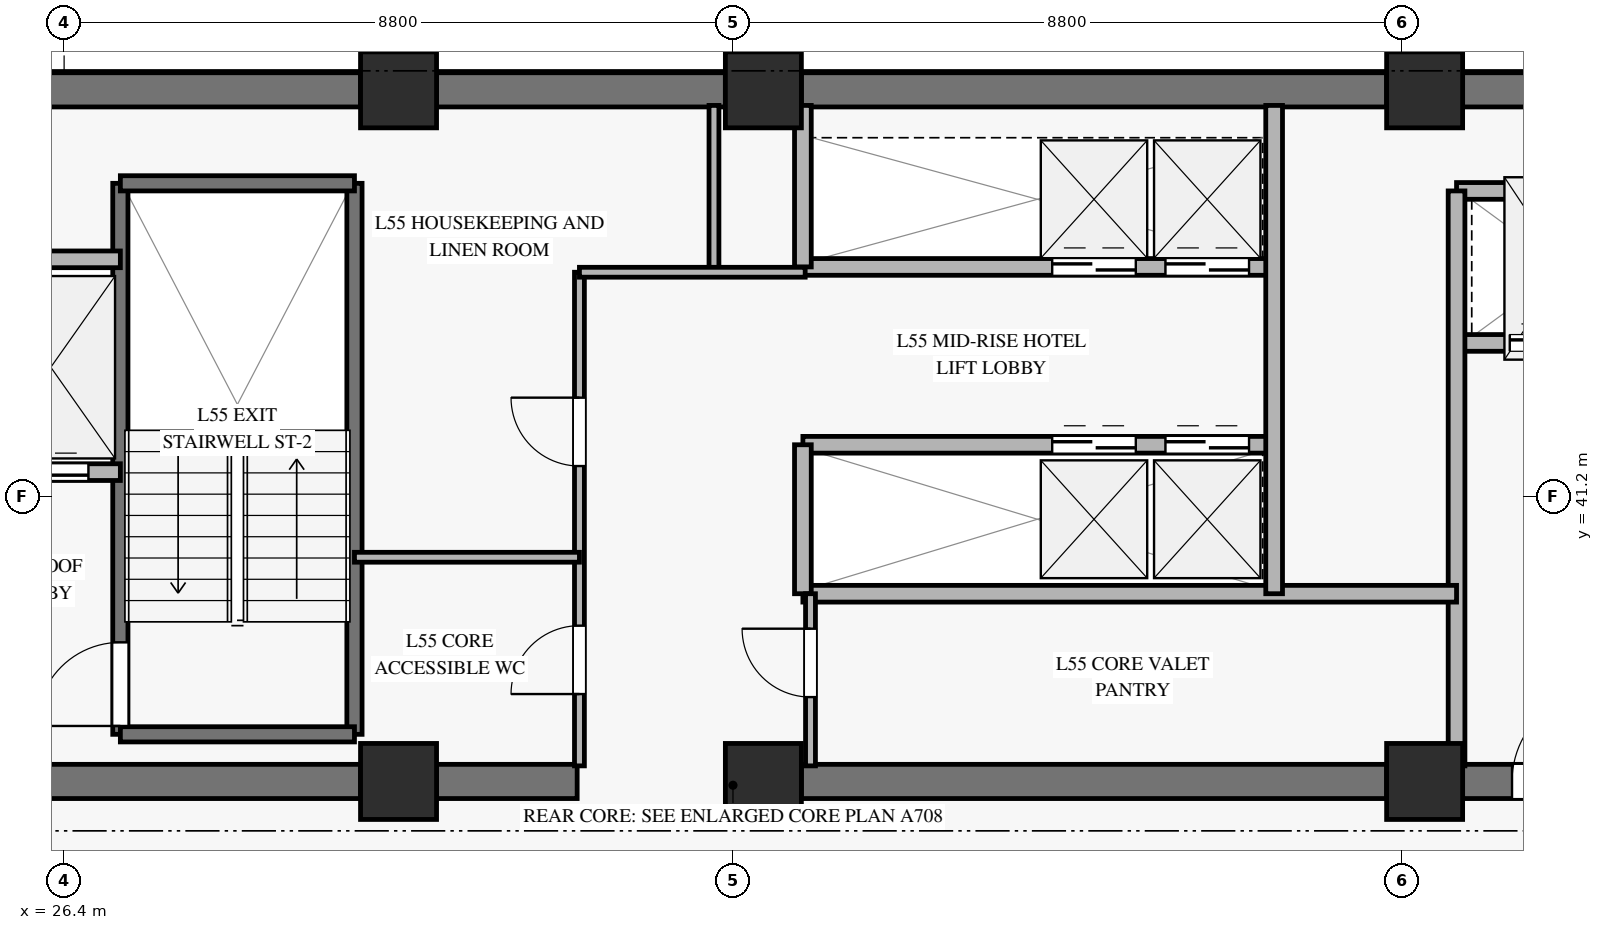
"""IFC4 building model, lengths in metres.
Left out: names, types, materials, properties, quantities, classifications, styles, units other than length and angle.
Written with IfcOpenShell. Run it as: python <this file> out.ifc"""

import sys

from ifc_helpers import new_model, si_unit, direction, frame, frame_2d, origin, origin_2d, place, context, subcontext, project, spatial, rectangle, extrude, source, transform, mapped, element, fill, save


model = new_model("IFC4")
c1 = context("Model", 3, precision=1e-05, world=origin(), true_north=direction((0.0, 1.0)))
c2 = subcontext(c1, "Body", "Model", "MODEL_VIEW")
j1 = project(units=[si_unit("LENGTHUNIT", "METRE"), si_unit("PLANEANGLEUNIT", "RADIAN")], contexts=[c1])
p1 = place(None, origin())
s1 = spatial("IfcSite", under=j1, at=p1, CompositionType="ELEMENT")
p2 = place(p1, origin())
s2 = spatial("IfcBuilding", under=s1, at=p2, CompositionType="ELEMENT")
p3 = place(p2, frame((0.0, 0.0, 216.7)))
s3 = spatial("IfcBuildingStorey", under=s2, at=p3, CompositionType="ELEMENT", Elevation=216.7)
m1 = source(origin(), c2, "Body", "SweptSolid", [
    extrude(rectangle(XDim=1.0, YDim=1.0, at=origin_2d()), origin(), (0.0, 0.0, 1.0), 3.24),
])
for number, where, z_axis, x_axis in (
    (1, (30.8, 37.45, 0.0), (0.0, 0.0, 1.0), (1.0, 0.0, 0.0)),
    (2, (30.8, 46.55, 0.0), (0.0, 0.0, 1.0), (1.0, 0.0, 0.0)),
    (3, (35.6, 37.45, 0.0), (0.0, 0.0, 1.0), (1.0, 0.0, 0.0)),
    (4, (35.6, 46.55, 0.0), (0.0, 0.0, 1.0), (1.0, 0.0, 0.0)),
    (5, (44.3, 37.45, 0.0), (0.0, 0.0, 1.0), (1.0, 0.0, 0.0)),
    (6, (44.3, 46.55, 0.0), (0.0, 0.0, 1.0), (1.0, 0.0, 0.0)),
):
    element("IfcColumn", number, at=place(p3, frame(where, z_axis=z_axis, x_axis=x_axis)), inside=s3, PredefinedType="PILASTER", context=c2, shape_type="MappedRepresentation", body=[
        mapped(m1, transform((0.0, 0.0, 0.0), x_axis=(1.0, 0.0, 0.0), y_axis=(0.0, 1.0, 0.0), z_axis=(0.0, 0.0, 1.0), scale=1.0)),
    ])
p4 = place(p3, frame((20.35, 46.55, 0.0), z_axis=(0.0, 0.0, 1.0), x_axis=(1.0, 0.0, 0.0)))
e7 = element("IfcWall", 7, at=p4, inside=s3, PredefinedType="SHEAR", context=c2, shape_type="SweptSolid", body=[
    extrude(rectangle(XDim=9.95, YDim=0.45, at=frame_2d((4.975, 0.0))), origin(), (0.0, 0.0, 1.0), 3.24),
])
p5 = place(p3, frame((31.3, 46.55, 0.0), z_axis=(0.0, 0.0, 1.0), x_axis=(1.0, 0.0, 0.0)))
e8 = element("IfcWall", 8, at=p5, inside=s3, PredefinedType="SHEAR", context=c2, shape_type="SweptSolid", body=[
    extrude(rectangle(XDim=3.8, YDim=0.45, at=frame_2d((1.9, 0.0))), origin(), (0.0, 0.0, 1.0), 3.24),
])
p6 = place(p3, frame((36.1, 46.55, 0.0), z_axis=(0.0, 0.0, 1.0), x_axis=(1.0, 0.0, 0.0)))
e9 = element("IfcWall", 9, at=p6, inside=s3, PredefinedType="SHEAR", context=c2, shape_type="SweptSolid", body=[
    extrude(rectangle(XDim=7.7, YDim=0.45, at=frame_2d((3.85, 0.0))), origin(), (0.0, 0.0, 1.0), 3.24),
])
p7 = place(p3, frame((44.8, 46.55, 0.0), z_axis=(0.0, 0.0, 1.0), x_axis=(1.0, 0.0, 0.0)))
e10 = element("IfcWall", 10, at=p7, inside=s3, PredefinedType="SHEAR", context=c2, shape_type="SweptSolid", body=[
    extrude(rectangle(XDim=5.25, YDim=0.45, at=frame_2d((2.625, 0.0))), origin(), (0.0, 0.0, 1.0), 3.24),
])
p8 = place(p3, frame((20.35, 37.45, 0.0), z_axis=(0.0, 0.0, 1.0), x_axis=(1.0, 0.0, 0.0)))
e11 = element("IfcWall", 11, at=p8, inside=s3, PredefinedType="SHEAR", context=c2, shape_type="SweptSolid", body=[
    extrude(rectangle(XDim=9.95, YDim=0.45, at=frame_2d((4.975, 0.0))), origin(), (0.0, 0.0, 1.0), 3.24),
])
p9 = place(p8, frame((4.2, 0.0, 0.0)))
e12 = element("IfcOpeningElement", 12, at=p9, cuts=e11, PredefinedType="OPENING", context=c2, shape_type="SweptSolid", body=[
    extrude(rectangle(XDim=1.2, YDim=2.15, at=frame_2d((0.6, 1.075))), frame((0.0, 0.235, 0.0), z_axis=(0.0, -1.0, 0.0), x_axis=(1.0, 0.0, 0.0)), (0.0, 0.0, 1.0), 0.47),
])
p10 = place(p3, frame((31.3, 37.45, 0.0), z_axis=(0.0, 0.0, 1.0), x_axis=(1.0, 0.0, 0.0)))
e13 = element("IfcWall", 13, at=p10, inside=s3, PredefinedType="SHEAR", context=c2, shape_type="SweptSolid", body=[
    extrude(rectangle(XDim=1.85, YDim=0.45, at=frame_2d((0.925, 0.0))), origin(), (0.0, 0.0, 1.0), 3.24),
])
p11 = place(p3, frame((36.1, 37.45, 0.0), z_axis=(0.0, 0.0, 1.0), x_axis=(1.0, 0.0, 0.0)))
e14 = element("IfcWall", 14, at=p11, inside=s3, PredefinedType="SHEAR", context=c2, shape_type="SweptSolid", body=[
    extrude(rectangle(XDim=7.7, YDim=0.45, at=frame_2d((3.85, 0.0))), origin(), (0.0, 0.0, 1.0), 3.24),
])
p12 = place(p3, frame((44.8, 37.45, 0.0), z_axis=(0.0, 0.0, 1.0), x_axis=(1.0, 0.0, 0.0)))
e15 = element("IfcWall", 15, at=p12, inside=s3, PredefinedType="SHEAR", context=c2, shape_type="SweptSolid", body=[
    extrude(rectangle(XDim=5.25, YDim=0.45, at=frame_2d((2.625, 0.0))), origin(), (0.0, 0.0, 1.0), 3.24),
])
p13 = place(p12, frame((0.65, 0.0, 0.0)))
e16 = element("IfcOpeningElement", 16, at=p13, cuts=e15, PredefinedType="OPENING", context=c2, shape_type="SweptSolid", body=[
    extrude(rectangle(XDim=1.2, YDim=2.15, at=frame_2d((0.6, 1.075))), frame((0.0, 0.235, 0.0), z_axis=(0.0, -1.0, 0.0), x_axis=(1.0, 0.0, 0.0)), (0.0, 0.0, 1.0), 0.47),
])
p14 = place(p3, frame((27.14, 38.07, 0.0), z_axis=(0.0, 0.0, 1.0), x_axis=(0.0, 1.0, 0.0)))
e17 = element("IfcWall", 17, at=p14, inside=s3, PredefinedType="SOLIDWALL", context=c2, shape_type="SweptSolid", body=[
    extrude(rectangle(XDim=7.25, YDim=0.2, at=frame_2d((3.625, 0.0))), origin(), (0.0, 0.0, 1.0), 3.5),
])
p15 = place(p14, frame((0.11, 0.0, 0.0)))
e18 = element("IfcOpeningElement", 18, at=p15, cuts=e17, PredefinedType="OPENING", context=c2, shape_type="SweptSolid", body=[
    extrude(rectangle(XDim=1.1, YDim=2.15, at=frame_2d((0.55, 1.075))), frame((0.0, 0.11, 0.0), z_axis=(0.0, -1.0, 0.0), x_axis=(1.0, 0.0, 0.0)), (0.0, 0.0, 1.0), 0.22),
])
p16 = place(p3, frame((30.22, 38.07, 0.0), z_axis=(0.0, 0.0, 1.0), x_axis=(0.0, 1.0, 0.0)))
e19 = element("IfcWall", 19, at=p16, inside=s3, PredefinedType="SOLIDWALL", context=c2, shape_type="SweptSolid", body=[
    extrude(rectangle(XDim=7.25, YDim=0.2, at=frame_2d((3.625, 0.0))), origin(), (0.0, 0.0, 1.0), 3.5),
])
for number, where, z_axis, x_axis in (
    (20, (27.14, 45.32, 0.0), (0.0, 0.0, 1.0), (1.0, 0.0, 0.0)),
    (21, (27.14, 38.07, 0.0), (0.0, 0.0, 1.0), (1.0, 0.0, 0.0)),
):
    element("IfcWall", number, at=place(p3, frame(where, z_axis=z_axis, x_axis=x_axis)), inside=s3, PredefinedType="SOLIDWALL", context=c2, shape_type="SweptSolid", body=[
        extrude(rectangle(XDim=3.08, YDim=0.2, at=frame_2d((1.54, 0.0))), origin(), (0.0, 0.0, 1.0), 3.5),
    ])
p17 = place(p3, frame((23.22, 41.52, 0.0), z_axis=(0.0, 0.0, 1.0), x_axis=(1.0, 0.0, 0.0)))
e22 = element("IfcWall", 22, at=p17, inside=s3, PredefinedType="SOLIDWALL", context=c2, shape_type="SweptSolid", body=[
    extrude(rectangle(XDim=3.92, YDim=0.22, at=frame_2d((1.96, 0.0))), origin(), (0.0, 0.0, 1.0), 3.24),
])
p18 = place(p17, frame((0.5, 0.0, 0.0)))
e23 = element("IfcOpeningElement", 23, at=p18, cuts=e22, PredefinedType="OPENING", context=c2, shape_type="SweptSolid", body=[
    extrude(rectangle(XDim=1.1, YDim=2.2, at=frame_2d((0.55, 1.1))), frame((0.0, 0.12, 0.0), z_axis=(0.0, -1.0, 0.0), x_axis=(1.0, 0.0, 0.0)), (0.0, 0.0, 1.0), 0.24),
])
p19 = place(p17, frame((2.4, 0.0, 0.0)))
e24 = element("IfcOpeningElement", 24, at=p19, cuts=e22, PredefinedType="OPENING", context=c2, shape_type="SweptSolid", body=[
    extrude(rectangle(XDim=1.1, YDim=2.2, at=frame_2d((0.55, 1.1))), frame((0.0, 0.12, 0.0), z_axis=(0.0, -1.0, 0.0), x_axis=(1.0, 0.0, 0.0)), (0.0, 0.0, 1.0), 0.24),
])
p20 = place(p3, frame((23.22, 44.32, 0.0), z_axis=(0.0, 0.0, 1.0), x_axis=(1.0, 0.0, 0.0)))
e25 = element("IfcWall", 25, at=p20, inside=s3, PredefinedType="SOLIDWALL", context=c2, shape_type="SweptSolid", body=[
    extrude(rectangle(XDim=3.92, YDim=0.22, at=frame_2d((1.96, 0.0))), origin(), (0.0, 0.0, 1.0), 3.24),
])
p21 = place(p3, frame((44.72, 43.22, 0.0), z_axis=(0.0, 0.0, 1.0), x_axis=(1.0, 0.0, 0.0)))
e26 = element("IfcWall", 26, at=p21, inside=s3, PredefinedType="SOLIDWALL", context=c2, shape_type="SweptSolid", body=[
    extrude(rectangle(XDim=2.72, YDim=0.22, at=frame_2d((1.36, 0.0))), origin(), (0.0, 0.0, 1.0), 3.24),
])
p22 = place(p21, frame((0.7, 0.0, 0.0)))
e27 = element("IfcOpeningElement", 27, at=p22, cuts=e26, PredefinedType="OPENING", context=c2, shape_type="SweptSolid", body=[
    extrude(rectangle(XDim=1.1, YDim=2.2, at=frame_2d((0.55, 1.1))), frame((0.0, 0.12, 0.0), z_axis=(0.0, -1.0, 0.0), x_axis=(1.0, 0.0, 0.0)), (0.0, 0.0, 1.0), 0.24),
])
p23 = place(p3, frame((44.72, 45.22, 0.0), z_axis=(0.0, 0.0, 1.0), x_axis=(1.0, 0.0, 0.0)))
e28 = element("IfcWall", 28, at=p23, inside=s3, PredefinedType="SOLIDWALL", context=c2, shape_type="SweptSolid", body=[
    extrude(rectangle(XDim=2.72, YDim=0.22, at=frame_2d((1.36, 0.0))), origin(), (0.0, 0.0, 1.0), 3.24),
])
p24 = place(p3, frame((44.72, 37.655, 0.0), z_axis=(0.0, 0.0, 1.0), x_axis=(0.0, 1.0, 0.0)))
e29 = element("IfcWall", 29, at=p24, inside=s3, PredefinedType="SOLIDWALL", context=c2, shape_type="SweptSolid", body=[
    extrude(rectangle(XDim=7.565, YDim=0.22, at=frame_2d((3.782, 0.0))), origin(), (0.0, 0.0, 1.0), 3.24),
])
p25 = place(p3, frame((36.12, 44.22, 0.0), z_axis=(0.0, 0.0, 1.0), x_axis=(1.0, 0.0, 0.0)))
e30 = element("IfcWall", 30, at=p25, inside=s3, PredefinedType="SOLIDWALL", context=c2, shape_type="SweptSolid", body=[
    extrude(rectangle(XDim=6.2, YDim=0.22, at=frame_2d((3.1, 0.0))), origin(), (0.0, 0.0, 1.0), 3.24),
])
p26 = place(p25, frame((3.28, 0.0, 0.0)))
e31 = element("IfcOpeningElement", 31, at=p26, cuts=e30, PredefinedType="OPENING", context=c2, shape_type="SweptSolid", body=[
    extrude(rectangle(XDim=1.1, YDim=2.2, at=frame_2d((0.55, 1.1))), frame((0.0, 0.12, 0.0), z_axis=(0.0, -1.0, 0.0), x_axis=(1.0, 0.0, 0.0)), (0.0, 0.0, 1.0), 0.24),
])
p27 = place(p25, frame((4.77, 0.0, 0.0)))
e32 = element("IfcOpeningElement", 32, at=p27, cuts=e30, PredefinedType="OPENING", context=c2, shape_type="SweptSolid", body=[
    extrude(rectangle(XDim=1.1, YDim=2.2, at=frame_2d((0.55, 1.1))), frame((0.0, 0.12, 0.0), z_axis=(0.0, -1.0, 0.0), x_axis=(1.0, 0.0, 0.0)), (0.0, 0.0, 1.0), 0.24),
])
p28 = place(p3, frame((36.12, 41.88, 0.0), z_axis=(0.0, 0.0, 1.0), x_axis=(1.0, 0.0, 0.0)))
e33 = element("IfcWall", 33, at=p28, inside=s3, PredefinedType="SOLIDWALL", context=c2, shape_type="SweptSolid", body=[
    extrude(rectangle(XDim=6.2, YDim=0.22, at=frame_2d((3.1, 0.0))), origin(), (0.0, 0.0, 1.0), 3.24),
])
p29 = place(p28, frame((3.28, 0.0, 0.0)))
e34 = element("IfcOpeningElement", 34, at=p29, cuts=e33, PredefinedType="OPENING", context=c2, shape_type="SweptSolid", body=[
    extrude(rectangle(XDim=1.1, YDim=2.2, at=frame_2d((0.55, 1.1))), frame((0.0, 0.12, 0.0), z_axis=(0.0, -1.0, 0.0), x_axis=(1.0, 0.0, 0.0)), (0.0, 0.0, 1.0), 0.24),
])
p30 = place(p28, frame((4.77, 0.0, 0.0)))
e35 = element("IfcOpeningElement", 35, at=p30, cuts=e33, PredefinedType="OPENING", context=c2, shape_type="SweptSolid", body=[
    extrude(rectangle(XDim=1.1, YDim=2.2, at=frame_2d((0.55, 1.1))), frame((0.0, 0.12, 0.0), z_axis=(0.0, -1.0, 0.0), x_axis=(1.0, 0.0, 0.0)), (0.0, 0.0, 1.0), 0.24),
])
p31 = place(p3, frame((36.12, 39.92, 0.0), z_axis=(0.0, 0.0, 1.0), x_axis=(1.0, 0.0, 0.0)))
e36 = element("IfcWall", 36, at=p31, inside=s3, PredefinedType="SOLIDWALL", context=c2, shape_type="SweptSolid", body=[
    extrude(rectangle(XDim=8.6, YDim=0.22, at=frame_2d((4.3, 0.0))), origin(), (0.0, 0.0, 1.0), 2.525),
])
p32 = place(p3, frame((42.32, 39.92, 0.0), z_axis=(0.0, 0.0, 1.0), x_axis=(0.0, 1.0, 0.0)))
e37 = element("IfcWall", 37, at=p32, inside=s3, PredefinedType="SOLIDWALL", context=c2, shape_type="SweptSolid", body=[
    extrude(rectangle(XDim=6.425, YDim=0.22, at=frame_2d((3.212, 0.0))), origin(), (0.0, 0.0, 1.0), 3.24),
])
p33 = place(p3, frame((36.12, 39.92, 0.0), z_axis=(0.0, 0.0, 1.0), x_axis=(0.0, 1.0, 0.0)))
e38 = element("IfcWall", 38, at=p33, inside=s3, PredefinedType="SOLIDWALL", context=c2, shape_type="SweptSolid", body=[
    extrude(rectangle(XDim=1.96, YDim=0.22, at=frame_2d((0.98, 0.0))), origin(), (0.0, 0.0, 1.0), 3.24),
])
p34 = place(p3, frame((36.12, 44.22, 0.0), z_axis=(0.0, 0.0, 1.0), x_axis=(0.0, 1.0, 0.0)))
e39 = element("IfcWall", 39, at=p34, inside=s3, PredefinedType="SOLIDWALL", context=c2, shape_type="SweptSolid", body=[
    extrude(rectangle(XDim=2.125, YDim=0.22, at=frame_2d((1.062, 0.0))), origin(), (0.0, 0.0, 1.0), 3.24),
])
p35 = place(p3, frame((33.18, 37.655, 0.0), z_axis=(0.0, 0.0, 1.0), x_axis=(0.0, 1.0, 0.0)))
e40 = element("IfcWall", 40, at=p35, inside=s3, PredefinedType="PARTITIONING", context=c2, shape_type="SweptSolid", body=[
    extrude(rectangle(XDim=6.495, YDim=0.13, at=frame_2d((3.248, 0.0))), origin(), (0.0, 0.0, 1.0), 2.325),
])
p36 = place(p35, frame((0.945, 0.0, 0.0)))
e41 = element("IfcOpeningElement", 41, at=p36, cuts=e40, PredefinedType="OPENING", context=c2, shape_type="SweptSolid", body=[
    extrude(rectangle(XDim=0.9, YDim=2.1, at=frame_2d((0.45, 1.05))), frame((0.0, 0.075, 0.0), z_axis=(0.0, -1.0, 0.0), x_axis=(1.0, 0.0, 0.0)), (0.0, 0.0, 1.0), 0.15),
])
p37 = place(p35, frame((3.945, 0.0, 0.0)))
e42 = element("IfcOpeningElement", 42, at=p37, cuts=e40, PredefinedType="OPENING", context=c2, shape_type="SweptSolid", body=[
    extrude(rectangle(XDim=0.9, YDim=2.1, at=frame_2d((0.45, 1.05))), frame((0.0, 0.075, 0.0), z_axis=(0.0, -1.0, 0.0), x_axis=(1.0, 0.0, 0.0)), (0.0, 0.0, 1.0), 0.15),
])
p38 = place(p3, frame((34.95, 44.15, 0.0), z_axis=(0.0, 0.0, 1.0), x_axis=(0.0, 1.0, 0.0)))
e43 = element("IfcWall", 43, at=p38, inside=s3, PredefinedType="PARTITIONING", context=c2, shape_type="SweptSolid", body=[
    extrude(rectangle(XDim=2.195, YDim=0.13, at=frame_2d((1.098, 0.0))), origin(), (0.0, 0.0, 1.0), 3.24),
])
p39 = place(p3, frame((33.18, 44.15, 0.0), z_axis=(0.0, 0.0, 1.0), x_axis=(1.0, 0.0, 0.0)))
e44 = element("IfcWall", 44, at=p39, inside=s3, PredefinedType="PARTITIONING", context=c2, shape_type="SweptSolid", body=[
    extrude(rectangle(XDim=2.97, YDim=0.13, at=frame_2d((1.485, 0.0))), origin(), (0.0, 0.0, 1.0), 2.525),
])
p40 = place(p3, frame((30.22, 40.4, 0.0), z_axis=(0.0, 0.0, 1.0), x_axis=(1.0, 0.0, 0.0)))
e45 = element("IfcWall", 45, at=p40, inside=s3, PredefinedType="PARTITIONING", context=c2, shape_type="SweptSolid", body=[
    extrude(rectangle(XDim=2.96, YDim=0.13, at=frame_2d((1.48, 0.0))), origin(), (0.0, 0.0, 1.0), 2.525),
])
p41 = place(p3, frame((36.22, 37.655, 0.0), z_axis=(0.0, 0.0, 1.0), x_axis=(0.0, 1.0, 0.0)))
e46 = element("IfcWall", 46, at=p41, inside=s3, PredefinedType="PARTITIONING", context=c2, shape_type="SweptSolid", body=[
    extrude(rectangle(XDim=2.265, YDim=0.13, at=frame_2d((1.132, 0.0))), origin(), (0.0, 0.0, 1.0), 3.24),
])
p42 = place(p41, frame((0.905, 0.0, 0.0)))
e47 = element("IfcOpeningElement", 47, at=p42, cuts=e46, PredefinedType="OPENING", context=c2, shape_type="SweptSolid", body=[
    extrude(rectangle(XDim=0.9, YDim=2.1, at=frame_2d((0.45, 1.05))), frame((0.0, 0.075, 0.0), z_axis=(0.0, -1.0, 0.0), x_axis=(1.0, 0.0, 0.0)), (0.0, 0.0, 1.0), 0.15),
])
m2 = source(origin(), c2, "Body", "SweptSolid", [
    extrude(rectangle(XDim=1.1, YDim=2.15, at=frame_2d((0.55, 1.075))), frame((0.0, 0.025, 0.0), z_axis=(0.0, -1.0, 0.0), x_axis=(1.0, 0.0, 0.0)), (0.0, 0.0, 1.0), 0.05),
])
p43 = place(p15, origin())
e48 = element("IfcDoor", 48, at=p43, inside=s3, OperationType="SINGLE_SWING_LEFT", PredefinedType="DOOR", context=c2, shape_type="MappedRepresentation", body=[
    mapped(m2, transform((0.0, 0.0, 0.0), x_axis=(1.0, 0.0, 0.0), y_axis=(0.0, 1.0, 0.0), z_axis=(0.0, 0.0, 1.0), scale=1.0)),
])
fill(e18, e48)
m3 = source(origin(), c2, "Body", "SweptSolid", [
    extrude(rectangle(XDim=1.1, YDim=2.2, at=frame_2d((0.55, 1.1))), frame((0.0, 0.025, 0.0), z_axis=(0.0, -1.0, 0.0), x_axis=(1.0, 0.0, 0.0)), (0.0, 0.0, 1.0), 0.05),
])
p44 = place(p19, origin())
e49 = element("IfcDoor", 49, at=p44, inside=s3, OperationType="SLIDING_TO_LEFT", PredefinedType="DOOR", context=c2, shape_type="MappedRepresentation", body=[
    mapped(m3, transform((0.0, 0.0, 0.0), x_axis=(1.0, 0.0, 0.0), y_axis=(0.0, 1.0, 0.0), z_axis=(0.0, 0.0, 1.0), scale=1.0)),
])
fill(e24, e49)
p45 = place(p22, origin())
e50 = element("IfcDoor", 50, at=p45, inside=s3, OperationType="SLIDING_TO_LEFT", PredefinedType="DOOR", context=c2, shape_type="MappedRepresentation", body=[
    mapped(m3, transform((0.0, 0.0, 0.0), x_axis=(1.0, 0.0, 0.0), y_axis=(0.0, 1.0, 0.0), z_axis=(0.0, 0.0, 1.0), scale=1.0)),
])
fill(e27, e50)
m4 = source(origin(), c2, "Body", "SweptSolid", [
    extrude(rectangle(XDim=1.2, YDim=2.15, at=frame_2d((0.6, 1.075))), frame((0.0, 0.025, 0.0), z_axis=(0.0, -1.0, 0.0), x_axis=(1.0, 0.0, 0.0)), (0.0, 0.0, 1.0), 0.05),
])
p46 = place(p13, origin())
e51 = element("IfcDoor", 51, at=p46, inside=s3, OperationType="SINGLE_SWING_RIGHT", PredefinedType="DOOR", context=c2, shape_type="MappedRepresentation", body=[
    mapped(m4, transform((0.0, 0.0, 0.0), x_axis=(1.0, 0.0, 0.0), y_axis=(0.0, 1.0, 0.0), z_axis=(0.0, 0.0, 1.0), scale=1.0)),
])
fill(e16, e51)
p47 = place(p26, origin())
e52 = element("IfcDoor", 52, at=p47, inside=s3, OperationType="SLIDING_TO_LEFT", PredefinedType="DOOR", context=c2, shape_type="MappedRepresentation", body=[
    mapped(m3, transform((0.0, 0.0, 0.0), x_axis=(1.0, 0.0, 0.0), y_axis=(0.0, 1.0, 0.0), z_axis=(0.0, 0.0, 1.0), scale=1.0)),
])
fill(e31, e52)
p48 = place(p27, origin())
e53 = element("IfcDoor", 53, at=p48, inside=s3, OperationType="SLIDING_TO_LEFT", PredefinedType="DOOR", context=c2, shape_type="MappedRepresentation", body=[
    mapped(m3, transform((0.0, 0.0, 0.0), x_axis=(1.0, 0.0, 0.0), y_axis=(0.0, 1.0, 0.0), z_axis=(0.0, 0.0, 1.0), scale=1.0)),
])
fill(e32, e53)
p49 = place(p29, origin())
e54 = element("IfcDoor", 54, at=p49, inside=s3, OperationType="SLIDING_TO_LEFT", PredefinedType="DOOR", context=c2, shape_type="MappedRepresentation", body=[
    mapped(m3, transform((0.0, 0.0, 0.0), x_axis=(1.0, 0.0, 0.0), y_axis=(0.0, 1.0, 0.0), z_axis=(0.0, 0.0, 1.0), scale=1.0)),
])
fill(e34, e54)
p50 = place(p30, origin())
e55 = element("IfcDoor", 55, at=p50, inside=s3, OperationType="SLIDING_TO_LEFT", PredefinedType="DOOR", context=c2, shape_type="MappedRepresentation", body=[
    mapped(m3, transform((0.0, 0.0, 0.0), x_axis=(1.0, 0.0, 0.0), y_axis=(0.0, 1.0, 0.0), z_axis=(0.0, 0.0, 1.0), scale=1.0)),
])
fill(e35, e55)
m5 = source(origin(), c2, "Body", "SweptSolid", [
    extrude(rectangle(XDim=0.9, YDim=2.1, at=frame_2d((0.45, 1.05))), frame((0.0, 0.025, 0.0), z_axis=(0.0, -1.0, 0.0), x_axis=(1.0, 0.0, 0.0)), (0.0, 0.0, 1.0), 0.05),
])
p51 = place(p36, origin())
e56 = element("IfcDoor", 56, at=p51, inside=s3, OperationType="SINGLE_SWING_LEFT", PredefinedType="DOOR", context=c2, shape_type="MappedRepresentation", body=[
    mapped(m5, transform((0.0, 0.0, 0.0), x_axis=(1.0, 0.0, 0.0), y_axis=(0.0, 1.0, 0.0), z_axis=(0.0, 0.0, 1.0), scale=1.0)),
])
fill(e41, e56)
p52 = place(p37, origin())
e57 = element("IfcDoor", 57, at=p52, inside=s3, OperationType="SINGLE_SWING_RIGHT", PredefinedType="DOOR", context=c2, shape_type="MappedRepresentation", body=[
    mapped(m5, transform((0.0, 0.0, 0.0), x_axis=(1.0, 0.0, 0.0), y_axis=(0.0, 1.0, 0.0), z_axis=(0.0, 0.0, 1.0), scale=1.0)),
])
fill(e42, e57)
p53 = place(p42, origin())
e58 = element("IfcDoor", 58, at=p53, inside=s3, OperationType="SINGLE_SWING_RIGHT", PredefinedType="DOOR", context=c2, shape_type="MappedRepresentation", body=[
    mapped(m5, transform((0.0, 0.0, 0.0), x_axis=(1.0, 0.0, 0.0), y_axis=(0.0, 1.0, 0.0), z_axis=(0.0, 0.0, 1.0), scale=1.0)),
])
fill(e47, e58)
save(model, sys.argv[1])
